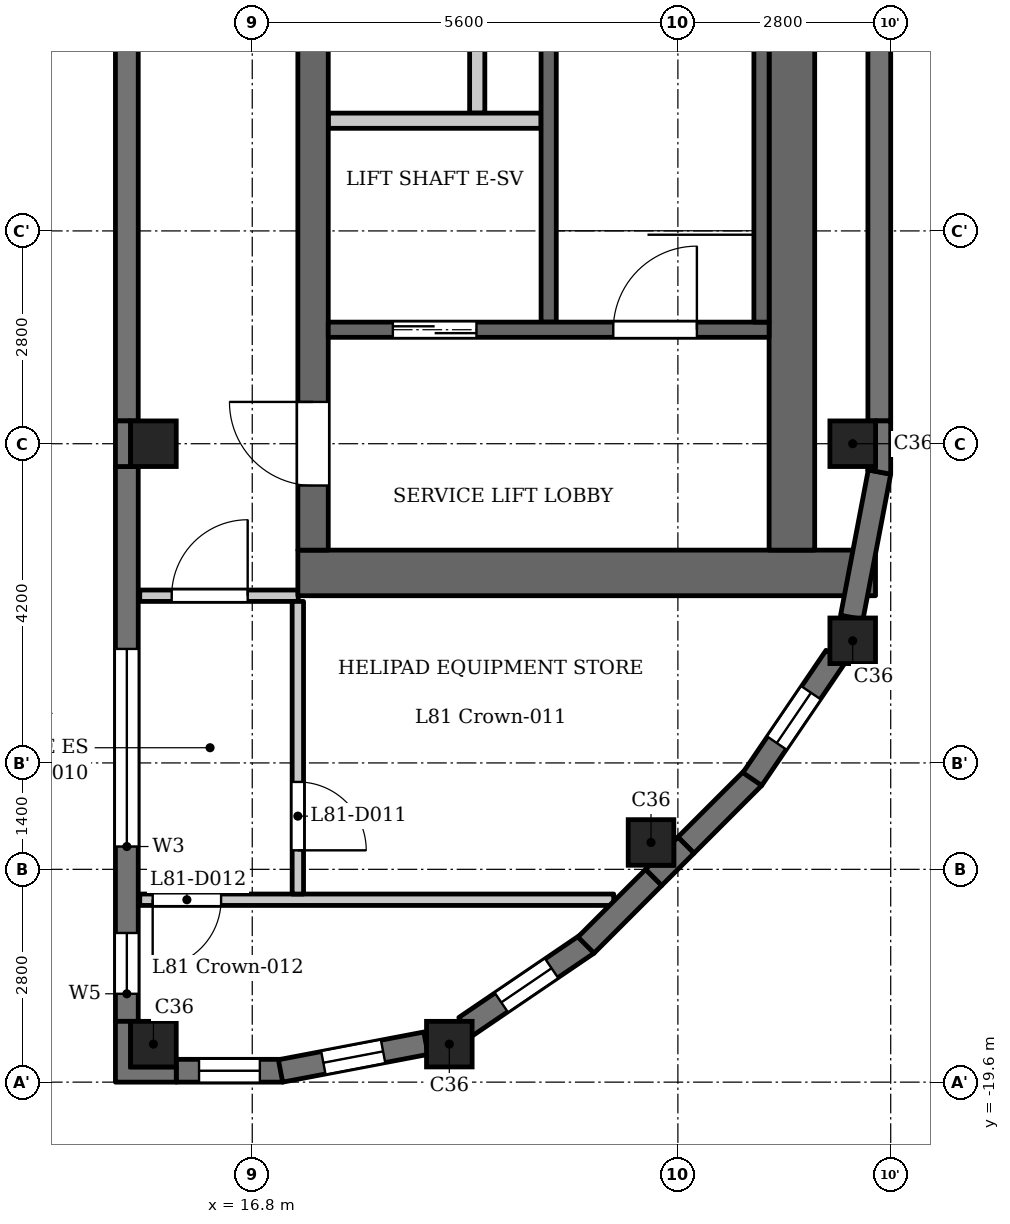
"""IFC4 building model, lengths in metres.
Left out: names, types, materials, properties, quantities, classifications, styles, units other than length and angle.
Written with IfcOpenShell. Run it as: python <this file> out.ifc"""

import sys

from ifc_helpers import new_model, si_unit, direction, frame, frame_2d, origin, origin_2d, place, context, subcontext, project, spatial, polyline, rectangle, outline, extrude, element, fill, save


model = new_model("IFC4")
c1 = context("Model", 3, precision=1e-05, world=origin(), true_north=direction((0.0, 1.0)))
c2 = subcontext(c1, "Body", "Model", "MODEL_VIEW")
j1 = project(units=[si_unit("LENGTHUNIT", "METRE"), si_unit("PLANEANGLEUNIT", "RADIAN")], contexts=[c1])
p1 = place(None, origin())
s1 = spatial("IfcSite", under=j1, at=p1, CompositionType="ELEMENT")
p2 = place(p1, origin())
s2 = spatial("IfcBuilding", under=s1, at=p2, CompositionType="ELEMENT")
p3 = place(p2, frame((0.0, 0.0, 313.9)))
s3 = spatial("IfcBuildingStorey", under=s2, at=p3, CompositionType="ELEMENT", Elevation=313.9)
for number, where, z_axis, x_axis in (
    (1, (15.5, -19.1, 0.0), (0.0, 0.0, 1.0), (1.0, 0.0, 0.0)),
    (2, (15.5, -11.2, 0.0), (0.0, 0.0, 1.0), (1.0, 0.0, 0.0)),
    (3, (19.393, -19.1, 0.0), (0.0, 0.0, 1.0), (1.0, 0.0, 0.0)),
    (4, (22.046, -16.446, 0.0), (0.0, 0.0, 1.0), (1.0, 0.0, 0.0)),
    (5, (24.7, -13.793, 0.0), (0.0, 0.0, 1.0), (1.0, 0.0, 0.0)),
    (6, (24.7, -11.2, 0.0), (0.0, 0.0, 1.0), (1.0, 0.0, 0.0)),
):
    element("IfcColumn", number, at=place(p3, frame(where, z_axis=z_axis, x_axis=x_axis)), inside=s3, PredefinedType="COLUMN", context=c2, shape_type="SweptSolid", body=[
        extrude(rectangle(XDim=0.6, YDim=0.6, at=origin_2d()), origin(), (0.0, 0.0, 1.0), 3.5),
    ])
p4 = place(p3, frame((15.15, -5.9, 0.0), z_axis=(0.0, 0.0, 1.0), x_axis=(0.0, -1.0, 0.0)))
e7 = element("IfcWall", 7, at=p4, inside=s3, PredefinedType="SOLIDWALL", context=c2, shape_type="SweptSolid", body=[
    extrude(rectangle(XDim=5.0, YDim=0.3, at=frame_2d((2.5, 0.0))), origin(), (0.0, 0.0, 1.0), 3.2),
])
p5 = place(p3, frame((15.15, -11.5, 0.0), z_axis=(0.0, 0.0, 1.0), x_axis=(0.0, -1.0, 0.0)))
e8 = element("IfcWall", 8, at=p5, inside=s3, PredefinedType="SOLIDWALL", context=c2, shape_type="SweptSolid", body=[
    extrude(rectangle(XDim=7.3, YDim=0.3, at=frame_2d((3.65, 0.0))), origin(), (0.0, 0.0, 1.0), 3.2),
])
p6 = place(p5, frame((2.4, 0.0, 0.9)))
e9 = element("IfcOpeningElement", 9, at=p6, cuts=e8, PredefinedType="OPENING", context=c2, shape_type="SweptSolid", body=[
    extrude(rectangle(XDim=2.6, YDim=1.25, at=frame_2d((1.3, 0.625))), frame((0.0, 0.16, 0.0), z_axis=(0.0, -1.0, 0.0), x_axis=(1.0, 0.0, 0.0)), (0.0, 0.0, 1.0), 0.32),
])
p7 = place(p5, frame((6.137, 0.0, 0.6)))
e10 = element("IfcOpeningElement", 10, at=p7, cuts=e8, PredefinedType="OPENING", context=c2, shape_type="SweptSolid", body=[
    extrude(rectangle(XDim=0.8, YDim=1.55, at=frame_2d((0.4, 0.775))), frame((0.0, 0.16, 0.0), z_axis=(0.0, -1.0, 0.0), x_axis=(1.0, 0.0, 0.0)), (0.0, 0.0, 1.0), 0.32),
])
p8 = place(p3, frame((15.8, -19.45, 0.0), z_axis=(0.0, 0.0, 1.0), x_axis=(1.0, 0.0, 0.0)))
e11 = element("IfcWall", 11, at=p8, inside=s3, PredefinedType="SOLIDWALL", context=c2, shape_type="SweptSolid", body=[
    extrude(rectangle(XDim=1.4, YDim=0.3, at=frame_2d((0.7, 0.0))), origin(), (0.0, 0.0, 1.0), 3.2),
])
p9 = place(p8, frame((0.3, 0.0, 0.6)))
e12 = element("IfcOpeningElement", 12, at=p9, cuts=e11, PredefinedType="OPENING", context=c2, shape_type="SweptSolid", body=[
    extrude(rectangle(XDim=0.8, YDim=1.55, at=frame_2d((0.4, 0.775))), frame((0.0, 0.16, 0.0), z_axis=(0.0, -1.0, 0.0), x_axis=(1.0, 0.0, 0.0)), (0.0, 0.0, 1.0), 0.32),
])
p10 = place(p3, frame((17.172, -19.453, 0.0), z_axis=(0.0, 0.0, 1.0), x_axis=(0.982286967073, 0.187382801553, 0.0)))
e13 = element("IfcWall", 13, at=p10, inside=s3, PredefinedType="SOLIDWALL", context=c2, shape_type="SweptSolid", body=[
    extrude(rectangle(XDim=1.948, YDim=0.3, at=frame_2d((0.974, 0.0))), origin(), (0.0, 0.0, 1.0), 2.6),
])
p11 = place(p10, frame((0.574, 0.0, 0.6)))
e14 = element("IfcOpeningElement", 14, at=p11, cuts=e13, PredefinedType="OPENING", context=c2, shape_type="SweptSolid", body=[
    extrude(rectangle(XDim=0.8, YDim=1.55, at=frame_2d((0.4, 0.775))), frame((0.0, 0.16, 0.0), z_axis=(0.0, -1.0, 0.0), x_axis=(1.0, 0.0, 0.0)), (0.0, 0.0, 1.0), 0.32),
])
p12 = place(p3, frame((19.602, -18.874, 0.0), z_axis=(0.0, 0.0, 1.0), x_axis=(0.827022075481, 0.562169446579, 0.0)))
e15 = element("IfcWall", 15, at=p12, inside=s3, PredefinedType="SOLIDWALL", context=c2, shape_type="SweptSolid", body=[
    extrude(rectangle(XDim=1.948, YDim=0.3, at=frame_2d((0.974, 0.0))), origin(), (0.0, 0.0, 1.0), 2.6),
])
p13 = place(p12, frame((0.574, 0.0, 0.6)))
e16 = element("IfcOpeningElement", 16, at=p13, cuts=e15, PredefinedType="OPENING", context=c2, shape_type="SweptSolid", body=[
    extrude(rectangle(XDim=0.8, YDim=1.55, at=frame_2d((0.4, 0.775))), frame((0.0, 0.16, 0.0), z_axis=(0.0, -1.0, 0.0), x_axis=(1.0, 0.0, 0.0)), (0.0, 0.0, 1.0), 0.32),
])
for number, where, z_axis, x_axis in (
    (17, (21.191, -17.797, 0.0), (0.0, 0.0, 1.0), (0.707, 0.707, 0.0)),
    (18, (22.506, -16.482, 0.0), (0.0, 0.0, 1.0), (0.707, 0.707, 0.0)),
):
    element("IfcWall", number, at=place(p3, frame(where, z_axis=z_axis, x_axis=x_axis)), inside=s3, PredefinedType="SOLIDWALL", context=c2, shape_type="SweptSolid", body=[
        extrude(rectangle(XDim=1.26, YDim=0.3, at=frame_2d((0.63, 0.0))), origin(), (0.0, 0.0, 1.0), 3.2),
    ])
p14 = place(p3, frame((23.379, -15.613, 0.0), z_axis=(0.0, 0.0, 1.0), x_axis=(0.562025435703, 0.827119948752, 0.0)))
e19 = element("IfcWall", 19, at=p14, inside=s3, PredefinedType="SOLIDWALL", context=c2, shape_type="SweptSolid", body=[
    extrude(rectangle(XDim=1.948, YDim=0.3, at=frame_2d((0.974, 0.0))), origin(), (0.0, 0.0, 1.0), 2.6),
])
p15 = place(p14, frame((0.574, 0.0, 0.6)))
e20 = element("IfcOpeningElement", 20, at=p15, cuts=e19, PredefinedType="OPENING", context=c2, shape_type="SweptSolid", body=[
    extrude(rectangle(XDim=0.8, YDim=1.55, at=frame_2d((0.4, 0.775))), frame((0.0, 0.16, 0.0), z_axis=(0.0, -1.0, 0.0), x_axis=(1.0, 0.0, 0.0)), (0.0, 0.0, 1.0), 0.32),
])
p16 = place(p3, frame((24.688, -13.485, 0.0), z_axis=(0.0, 0.0, 1.0), x_axis=(0.187354129902, 0.982292436095, 0.0)))
e21 = element("IfcWall", 21, at=p16, inside=s3, PredefinedType="SOLIDWALL", context=c2, shape_type="SweptSolid", body=[
    extrude(rectangle(XDim=1.947, YDim=0.3, at=frame_2d((0.973, 0.0))), origin(), (0.0, 0.0, 1.0), 2.6),
])
p17 = place(p3, frame((25.05, -10.9, 0.0), z_axis=(0.0, 0.0, 1.0), x_axis=(0.0, 1.0, 0.0)))
e22 = element("IfcWall", 22, at=p17, inside=s3, PredefinedType="SOLIDWALL", context=c2, shape_type="SweptSolid", body=[
    extrude(rectangle(XDim=5.0, YDim=0.3, at=frame_2d((2.5, 0.0))), origin(), (0.0, 0.0, 1.0), 3.2),
])
p18 = place(p3, frame((0.0, 0.0, 3.5)))
e23 = element("IfcWall", 23, at=p18, inside=s3, PredefinedType="PARAPET", context=c2, shape_type="SweptSolid", body=[
    extrude(outline(polyline([(15.0, 19.6), (15.0, -19.6), (17.2, -19.6), (19.424, -19.176), (21.297, -17.903), (23.503, -15.697), (24.776, -13.824), (25.2, -11.6), (25.2, 11.6), (24.776, 13.824), (23.503, 15.697), (21.297, 17.903), (19.424, 19.176), (17.2, 19.6), (15.0, 19.6)]), holes=[polyline([(17.172, -19.3), (15.3, -19.3), (15.3, 19.3), (17.172, 19.3), (19.307, 18.893), (21.105, 17.671), (23.271, 15.505), (24.493, 13.707), (24.9, 11.572), (24.9, -11.572), (24.493, -13.707), (23.271, -15.505), (21.105, -17.671), (19.307, -18.893), (17.172, -19.3)])]), origin(), (0.0, 0.0, 1.0), 1.5),
])
p19 = place(p3, frame((20.7, -9.6, 0.0), z_axis=(0.0, 0.0, 1.0), x_axis=(0.0, 1.0, 0.0)))
e24 = element("IfcWall", 24, at=p19, inside=s3, PredefinedType="SHEAR", context=c2, shape_type="SweptSolid", body=[
    extrude(rectangle(XDim=9.75, YDim=0.2, at=frame_2d((4.875, 0.0))), origin(), (0.0, 0.0, 1.0), 3.2),
])
p20 = place(p3, frame((17.4, -12.9, 0.0), z_axis=(0.0, 0.0, 1.0), x_axis=(1.0, 0.0, 0.0)))
e25 = element("IfcWall", 25, at=p20, inside=s3, PredefinedType="SHEAR", context=c2, shape_type="SweptSolid", body=[
    extrude(rectangle(XDim=7.6, YDim=0.6, at=frame_2d((3.8, 0.0))), origin(), (0.0, 0.0, 1.0), 3.2),
])
p21 = place(p3, frame((19.76, -6.85, 0.0), z_axis=(0.0, 0.0, 1.0), x_axis=(0.0, 1.0, 0.0)))
e26 = element("IfcWall", 26, at=p21, inside=s3, PredefinedType="PARTITIONING", context=c2, shape_type="SweptSolid", body=[
    extrude(rectangle(XDim=7.0, YDim=0.2, at=frame_2d((3.5, 0.0))), origin(), (0.0, 0.0, 1.0), 3.2),
])
p22 = place(p3, frame((17.6, -12.6, 0.0), z_axis=(0.0, 0.0, 1.0), x_axis=(0.0, 1.0, 0.0)))
e27 = element("IfcWall", 27, at=p22, inside=s3, PredefinedType="SHEAR", context=c2, shape_type="SweptSolid", body=[
    extrude(rectangle(XDim=25.2, YDim=0.4, at=frame_2d((12.6, 0.0))), origin(), (0.0, 0.0, 1.0), 3.2),
])
p23 = place(p22, frame((8.8, 0.0, 0.0)))
e28 = element("IfcOpeningElement", 28, at=p23, cuts=e27, PredefinedType="OPENING", context=c2, shape_type="SweptSolid", body=[
    extrude(rectangle(XDim=0.9, YDim=2.1, at=frame_2d((0.45, 1.05))), frame((0.0, 0.21, 0.0), z_axis=(0.0, -1.0, 0.0), x_axis=(1.0, 0.0, 0.0)), (0.0, 0.0, 1.0), 0.42),
])
p24 = place(p22, frame((17.05, 0.0, 0.0)))
e29 = element("IfcOpeningElement", 29, at=p24, cuts=e27, PredefinedType="OPENING", context=c2, shape_type="SweptSolid", body=[
    extrude(rectangle(XDim=0.9, YDim=2.1, at=frame_2d((0.45, 1.05))), frame((0.0, 0.21, 0.0), z_axis=(0.0, -1.0, 0.0), x_axis=(1.0, 0.0, 0.0)), (0.0, 0.0, 1.0), 0.42),
])
p25 = place(p22, frame((23.25, 0.0, 0.0)))
e30 = element("IfcOpeningElement", 30, at=p25, cuts=e27, PredefinedType="OPENING", context=c2, shape_type="SweptSolid", body=[
    extrude(rectangle(XDim=1.1, YDim=2.1, at=frame_2d((0.55, 1.05))), frame((0.0, 0.21, 0.0), z_axis=(0.0, -1.0, 0.0), x_axis=(1.0, 0.0, 0.0)), (0.0, 0.0, 1.0), 0.42),
])
p26 = place(p22, frame((0.85, 0.0, 0.0)))
e31 = element("IfcOpeningElement", 31, at=p26, cuts=e27, PredefinedType="OPENING", context=c2, shape_type="SweptSolid", body=[
    extrude(rectangle(XDim=1.1, YDim=2.1, at=frame_2d((0.55, 1.05))), frame((0.0, 0.21, 0.0), z_axis=(0.0, -1.0, 0.0), x_axis=(1.0, 0.0, 0.0)), (0.0, 0.0, 1.0), 0.42),
])
p27 = place(p22, frame((13.075, 0.0, 0.0)))
e32 = element("IfcOpeningElement", 32, at=p27, cuts=e27, PredefinedType="OPENING", context=c2, shape_type="SweptSolid", body=[
    extrude(rectangle(XDim=1.8, YDim=2.1, at=frame_2d((0.9, 1.05))), frame((0.0, 0.21, 0.0), z_axis=(0.0, -1.0, 0.0), x_axis=(1.0, 0.0, 0.0)), (0.0, 0.0, 1.0), 0.42),
])
p28 = place(p3, frame((23.9, -12.6, 0.0), z_axis=(0.0, 0.0, 1.0), x_axis=(0.0, 1.0, 0.0)))
e33 = element("IfcWall", 33, at=p28, inside=s3, PredefinedType="SHEAR", context=c2, shape_type="SweptSolid", body=[
    extrude(rectangle(XDim=25.2, YDim=0.6, at=frame_2d((12.6, 0.0))), origin(), (0.0, 0.0, 1.0), 3.2),
])
p29 = place(p3, frame((17.8, -9.7, 0.0), z_axis=(0.0, 0.0, 1.0), x_axis=(1.0, 0.0, 0.0)))
e34 = element("IfcWall", 34, at=p29, inside=s3, PredefinedType="SHEAR", context=c2, shape_type="SweptSolid", body=[
    extrude(rectangle(XDim=5.8, YDim=0.2, at=frame_2d((2.9, 0.0))), origin(), (0.0, 0.0, 1.0), 3.2),
])
p30 = place(p29, frame((0.85, 0.0, 0.0)))
e35 = element("IfcOpeningElement", 35, at=p30, cuts=e34, PredefinedType="OPENING", context=c2, shape_type="SweptSolid", body=[
    extrude(rectangle(XDim=1.1, YDim=2.1, at=frame_2d((0.55, 1.05))), frame((0.0, 0.11, 0.0), z_axis=(0.0, -1.0, 0.0), x_axis=(1.0, 0.0, 0.0)), (0.0, 0.0, 1.0), 0.22),
])
p31 = place(p29, frame((3.75, 0.0, 0.0)))
e36 = element("IfcOpeningElement", 36, at=p31, cuts=e34, PredefinedType="OPENING", context=c2, shape_type="SweptSolid", body=[
    extrude(rectangle(XDim=1.1, YDim=2.1, at=frame_2d((0.55, 1.05))), frame((0.0, 0.11, 0.0), z_axis=(0.0, -1.0, 0.0), x_axis=(1.0, 0.0, 0.0)), (0.0, 0.0, 1.0), 0.22),
])
p32 = place(p3, frame((17.8, -6.95, 0.0), z_axis=(0.0, 0.0, 1.0), x_axis=(1.0, 0.0, 0.0)))
e37 = element("IfcWall", 37, at=p32, inside=s3, PredefinedType="PARTITIONING", context=c2, shape_type="SweptSolid", body=[
    extrude(rectangle(XDim=2.8, YDim=0.2, at=frame_2d((1.4, 0.0))), origin(), (0.0, 0.0, 1.0), 3.2),
])
p33 = place(p3, frame((23.5, -9.6, 0.0), z_axis=(0.0, 0.0, 1.0), x_axis=(0.0, 1.0, 0.0)))
e38 = element("IfcWall", 38, at=p33, inside=s3, PredefinedType="SHEAR", context=c2, shape_type="SweptSolid", body=[
    extrude(rectangle(XDim=6.9, YDim=0.2, at=frame_2d((3.45, 0.0))), origin(), (0.0, 0.0, 1.0), 3.2),
])
p34 = place(p3, frame((15.32, -17.2, 0.0), z_axis=(0.0, 0.0, 1.0), x_axis=(1.0, 0.0, 0.0)))
e39 = element("IfcWall", 39, at=p34, inside=s3, PredefinedType="PARTITIONING", context=c2, shape_type="SweptSolid", body=[
    extrude(rectangle(XDim=6.236, YDim=0.15, at=frame_2d((3.118, 0.0))), origin(), (0.0, 0.0, 1.0), 3.2),
])
p35 = place(p34, frame((0.17, 0.0, 0.0)))
e40 = element("IfcOpeningElement", 40, at=p35, cuts=e39, PredefinedType="OPENING", context=c2, shape_type="SweptSolid", body=[
    extrude(rectangle(XDim=0.9, YDim=2.1, at=frame_2d((0.45, 1.05))), frame((0.0, 0.085, 0.0), z_axis=(0.0, -1.0, 0.0), x_axis=(1.0, 0.0, 0.0)), (0.0, 0.0, 1.0), 0.17),
])
p36 = place(p3, frame((15.32, -13.2, 0.0), z_axis=(0.0, 0.0, 1.0), x_axis=(1.0, 0.0, 0.0)))
e41 = element("IfcWall", 41, at=p36, inside=s3, PredefinedType="PARTITIONING", context=c2, shape_type="SweptSolid", body=[
    extrude(rectangle(XDim=2.085, YDim=0.15, at=frame_2d((1.042, 0.0))), origin(), (0.0, 0.0, 1.0), 3.2),
])
p37 = place(p36, frame((0.42, 0.0, 0.0)))
e42 = element("IfcOpeningElement", 42, at=p37, cuts=e41, PredefinedType="OPENING", context=c2, shape_type="SweptSolid", body=[
    extrude(rectangle(XDim=1.0, YDim=2.1, at=frame_2d((0.5, 1.05))), frame((0.0, 0.085, 0.0), z_axis=(0.0, -1.0, 0.0), x_axis=(1.0, 0.0, 0.0)), (0.0, 0.0, 1.0), 0.17),
])
p38 = place(p3, frame((17.4, -17.125, 0.0), z_axis=(0.0, 0.0, 1.0), x_axis=(0.0, 1.0, 0.0)))
e43 = element("IfcWall", 43, at=p38, inside=s3, PredefinedType="PARTITIONING", context=c2, shape_type="SweptSolid", body=[
    extrude(rectangle(XDim=3.85, YDim=0.15, at=frame_2d((1.925, 0.0))), origin(), (0.0, 0.0, 1.0), 3.2),
])
p39 = place(p38, frame((0.575, 0.0, 0.0)))
e44 = element("IfcOpeningElement", 44, at=p39, cuts=e43, PredefinedType="OPENING", context=c2, shape_type="SweptSolid", body=[
    extrude(rectangle(XDim=0.9, YDim=2.1, at=frame_2d((0.45, 1.05))), frame((0.0, 0.085, 0.0), z_axis=(0.0, -1.0, 0.0), x_axis=(1.0, 0.0, 0.0)), (0.0, 0.0, 1.0), 0.17),
])
p40 = place(p3, origin())
e45 = element("IfcWall", 45, at=p40, inside=s3, PredefinedType="SOLIDWALL", context=c2, shape_type="SweptSolid", body=[
    extrude(outline(polyline([(25.2, -11.601), (25.2, -10.9), (25.0, -10.9), (25.0, -11.5), (24.9, -11.5), (24.9, -11.561), (24.903, -11.544), (25.2, -11.601)])), origin(), (0.0, 0.0, 1.0), 3.2),
])
e46 = element("IfcWall", 46, at=p40, inside=s3, PredefinedType="SOLIDWALL", context=c2, shape_type="SweptSolid", body=[
    extrude(outline(polyline([(21.976, -16.8), (22.188, -17.012), (22.612, -16.588), (22.4, -16.376), (22.346, -16.429), (22.346, -16.746), (22.029, -16.746), (21.976, -16.8)])), origin(), (0.0, 0.0, 1.0), 3.2),
])
e47 = element("IfcWall", 47, at=p40, inside=s3, PredefinedType="SOLIDWALL", context=c2, shape_type="SweptSolid", body=[
    extrude(outline(polyline([(15.0, -18.8), (15.0, -19.6), (15.8, -19.6), (15.8, -19.4), (15.2, -19.4), (15.2, -18.8), (15.0, -18.8)])), origin(), (0.0, 0.0, 1.0), 3.2),
])
e48 = element("IfcWall", 48, at=p40, inside=s3, PredefinedType="SOLIDWALL", context=c2, shape_type="SweptSolid", body=[
    extrude(outline(polyline([(15.2, -10.9), (15.0, -10.9), (15.0, -11.5), (15.2, -11.5), (15.2, -10.9)])), origin(), (0.0, 0.0, 1.0), 3.2),
])
p41 = place(p30, origin())
e49 = element("IfcDoor", 49, at=p41, inside=s3, OperationType="DOUBLE_DOOR_SLIDING", PredefinedType="DOOR", context=c2, shape_type="SweptSolid", body=[
    extrude(rectangle(XDim=1.1, YDim=2.1, at=frame_2d((0.55, 1.05))), frame((0.0, 0.025, 0.0), z_axis=(0.0, -1.0, 0.0), x_axis=(1.0, 0.0, 0.0)), (0.0, 0.0, 1.0), 0.05),
])
fill(e35, e49)
p42 = place(p26, origin())
e50 = element("IfcDoor", 50, at=p42, inside=s3, OperationType="SINGLE_SWING_LEFT", PredefinedType="DOOR", context=c2, shape_type="SweptSolid", body=[
    extrude(rectangle(XDim=1.1, YDim=2.1, at=frame_2d((0.55, 1.05))), frame((0.0, 0.025, 0.0), z_axis=(0.0, -1.0, 0.0), x_axis=(1.0, 0.0, 0.0)), (0.0, 0.0, 1.0), 0.05),
])
fill(e31, e50)
p43 = place(p31, origin())
e51 = element("IfcDoor", 51, at=p43, inside=s3, OperationType="SINGLE_SWING_LEFT", PredefinedType="DOOR", context=c2, shape_type="SweptSolid", body=[
    extrude(rectangle(XDim=1.1, YDim=2.1, at=frame_2d((0.55, 1.05))), frame((0.0, 0.025, 0.0), z_axis=(0.0, -1.0, 0.0), x_axis=(1.0, 0.0, 0.0)), (0.0, 0.0, 1.0), 0.05),
])
fill(e36, e51)
p44 = place(p37, origin())
e52 = element("IfcDoor", 52, at=p44, inside=s3, OperationType="SINGLE_SWING_LEFT", PredefinedType="DOOR", context=c2, shape_type="SweptSolid", body=[
    extrude(rectangle(XDim=1.0, YDim=2.1, at=frame_2d((0.5, 1.05))), frame((0.0, 0.025, 0.0), z_axis=(0.0, -1.0, 0.0), x_axis=(1.0, 0.0, 0.0)), (0.0, 0.0, 1.0), 0.05),
])
fill(e42, e52)
p45 = place(p39, origin())
e53 = element("IfcDoor", 53, at=p45, inside=s3, OperationType="SINGLE_SWING_LEFT", PredefinedType="DOOR", context=c2, shape_type="SweptSolid", body=[
    extrude(rectangle(XDim=0.9, YDim=2.1, at=frame_2d((0.45, 1.05))), frame((0.0, 0.025, 0.0), z_axis=(0.0, -1.0, 0.0), x_axis=(1.0, 0.0, 0.0)), (0.0, 0.0, 1.0), 0.05),
])
fill(e44, e53)
p46 = place(p35, origin())
e54 = element("IfcDoor", 54, at=p46, inside=s3, OperationType="SINGLE_SWING_LEFT", PredefinedType="DOOR", context=c2, shape_type="SweptSolid", body=[
    extrude(rectangle(XDim=0.9, YDim=2.1, at=frame_2d((0.45, 1.05))), frame((0.0, 0.025, 0.0), z_axis=(0.0, -1.0, 0.0), x_axis=(1.0, 0.0, 0.0)), (0.0, 0.0, 1.0), 0.05),
])
fill(e40, e54)
p47 = place(p6, origin())
e55 = element("IfcWindow", 55, at=p47, inside=s3, PartitioningType="SINGLE_PANEL", PredefinedType="WINDOW", context=c2, shape_type="SweptSolid", body=[
    extrude(rectangle(XDim=2.6, YDim=1.25, at=frame_2d((1.3, 0.625))), frame((0.0, 0.03, 0.0), z_axis=(0.0, -1.0, 0.0), x_axis=(1.0, 0.0, 0.0)), (0.0, 0.0, 1.0), 0.06),
])
fill(e9, e55)
p48 = place(p7, origin())
e56 = element("IfcWindow", 56, at=p48, inside=s3, PartitioningType="SINGLE_PANEL", PredefinedType="WINDOW", context=c2, shape_type="SweptSolid", body=[
    extrude(rectangle(XDim=0.8, YDim=1.55, at=frame_2d((0.4, 0.775))), frame((0.0, 0.03, 0.0), z_axis=(0.0, -1.0, 0.0), x_axis=(1.0, 0.0, 0.0)), (0.0, 0.0, 1.0), 0.06),
])
fill(e10, e56)
p49 = place(p9, origin())
e57 = element("IfcWindow", 57, at=p49, inside=s3, PartitioningType="SINGLE_PANEL", PredefinedType="WINDOW", context=c2, shape_type="SweptSolid", body=[
    extrude(rectangle(XDim=0.8, YDim=1.55, at=frame_2d((0.4, 0.775))), frame((0.0, 0.03, 0.0), z_axis=(0.0, -1.0, 0.0), x_axis=(1.0, 0.0, 0.0)), (0.0, 0.0, 1.0), 0.06),
])
fill(e12, e57)
p50 = place(p11, origin())
e58 = element("IfcWindow", 58, at=p50, inside=s3, PartitioningType="SINGLE_PANEL", PredefinedType="WINDOW", context=c2, shape_type="SweptSolid", body=[
    extrude(rectangle(XDim=0.8, YDim=1.55, at=frame_2d((0.4, 0.775))), frame((0.0, 0.03, 0.0), z_axis=(0.0, -1.0, 0.0), x_axis=(1.0, 0.0, 0.0)), (0.0, 0.0, 1.0), 0.06),
])
fill(e14, e58)
p51 = place(p13, origin())
e59 = element("IfcWindow", 59, at=p51, inside=s3, PartitioningType="SINGLE_PANEL", PredefinedType="WINDOW", context=c2, shape_type="SweptSolid", body=[
    extrude(rectangle(XDim=0.8, YDim=1.55, at=frame_2d((0.4, 0.775))), frame((0.0, 0.03, 0.0), z_axis=(0.0, -1.0, 0.0), x_axis=(1.0, 0.0, 0.0)), (0.0, 0.0, 1.0), 0.06),
])
fill(e16, e59)
p52 = place(p15, origin())
e60 = element("IfcWindow", 60, at=p52, inside=s3, PartitioningType="SINGLE_PANEL", PredefinedType="WINDOW", context=c2, shape_type="SweptSolid", body=[
    extrude(rectangle(XDim=0.8, YDim=1.55, at=frame_2d((0.4, 0.775))), frame((0.0, 0.03, 0.0), z_axis=(0.0, -1.0, 0.0), x_axis=(1.0, 0.0, 0.0)), (0.0, 0.0, 1.0), 0.06),
])
fill(e20, e60)
save(model, sys.argv[1])
